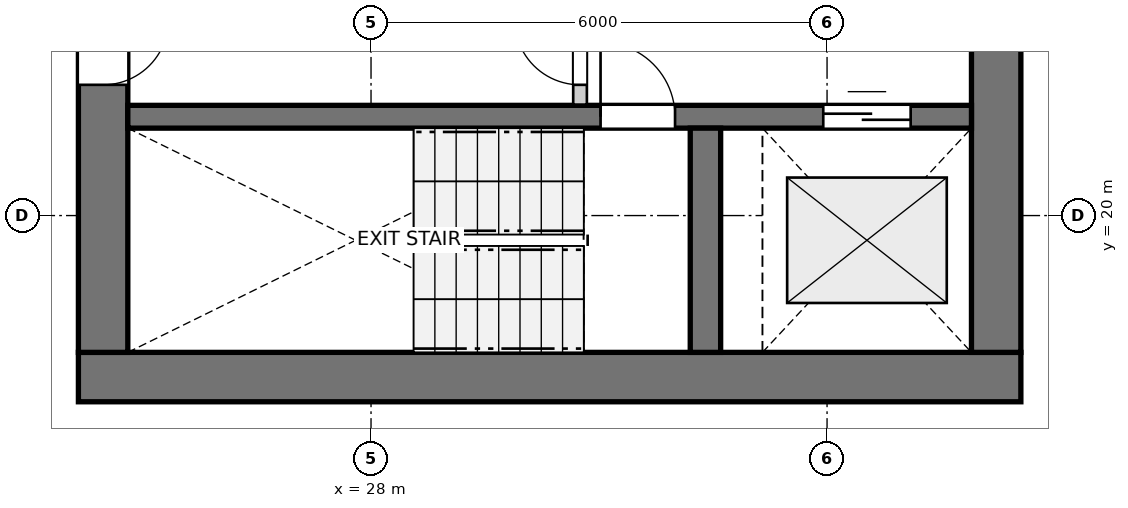
"""IFC4 building model, lengths in metres.
Left out: names, types, materials, properties, quantities, classifications, styles, units other than length and angle.
Written with IfcOpenShell. Run it as: python <this file> out.ifc"""

import sys

from ifc_helpers import new_model, si_unit, direction, frame, frame_2d, origin, place, context, subcontext, project, spatial, rectangle, extrude, source, transform, mapped, element, fill, save


model = new_model("IFC4")
c1 = context("Model", 3, precision=1e-05, world=origin(), true_north=direction((0.0, 1.0)))
c2 = subcontext(c1, "Body", "Model", "MODEL_VIEW")
j1 = project(units=[si_unit("LENGTHUNIT", "METRE"), si_unit("PLANEANGLEUNIT", "RADIAN")], contexts=[c1])
p1 = place(None, origin())
s1 = spatial("IfcSite", under=j1, at=p1, CompositionType="ELEMENT")
p2 = place(p1, origin())
s2 = spatial("IfcBuilding", under=s1, at=p2, CompositionType="ELEMENT")
p3 = place(p2, frame((0.0, 0.0, 76.8)))
s3 = spatial("IfcBuildingStorey", under=s2, at=p3, CompositionType="ELEMENT", Elevation=76.8)
p4 = place(p3, frame((24.15, 17.875, 0.0), z_axis=(0.0, 0.0, 1.0), x_axis=(1.0, 0.0, 0.0)))
e1 = element("IfcWall", 1, at=p4, inside=s3, PredefinedType="SHEAR", context=c2, shape_type="SweptSolid", body=[
    extrude(rectangle(XDim=12.4, YDim=0.65, at=frame_2d((6.2, 0.0))), origin(), (0.0, 0.0, 1.0), 2.935),
])
p5 = place(p3, frame((24.475, 33.8, 0.0), z_axis=(0.0, 0.0, 1.0), x_axis=(0.0, -1.0, 0.0)))
e2 = element("IfcWall", 2, at=p5, inside=s3, PredefinedType="SHEAR", context=c2, shape_type="SweptSolid", body=[
    extrude(rectangle(XDim=15.6, YDim=0.65, at=frame_2d((7.8, 0.0))), origin(), (0.0, 0.0, 1.0), 2.935),
])
p6 = place(p5, frame((7.05, 0.0, 0.0)))
e3 = element("IfcOpeningElement", 3, at=p6, cuts=e2, PredefinedType="OPENING", context=c2, shape_type="SweptSolid", body=[
    extrude(rectangle(XDim=1.5, YDim=2.15, at=frame_2d((0.75, 1.075))), frame((0.0, 0.335, 0.0), z_axis=(0.0, -1.0, 0.0), x_axis=(1.0, 0.0, 0.0)), (0.0, 0.0, 1.0), 0.67),
])
p7 = place(p5, frame((3.52, 0.0, 0.0)))
e4 = element("IfcOpeningElement", 4, at=p7, cuts=e2, PredefinedType="OPENING", context=c2, shape_type="SweptSolid", body=[
    extrude(rectangle(XDim=0.86, YDim=2.05, at=frame_2d((0.43, 1.025))), frame((0.0, 0.335, 0.0), z_axis=(0.0, -1.0, 0.0), x_axis=(1.0, 0.0, 0.0)), (0.0, 0.0, 1.0), 0.67),
])
p8 = place(p5, frame((11.22, 0.0, 0.0)))
e5 = element("IfcOpeningElement", 5, at=p8, cuts=e2, PredefinedType="OPENING", context=c2, shape_type="SweptSolid", body=[
    extrude(rectangle(XDim=0.86, YDim=2.05, at=frame_2d((0.43, 1.025))), frame((0.0, 0.335, 0.0), z_axis=(0.0, -1.0, 0.0), x_axis=(1.0, 0.0, 0.0)), (0.0, 0.0, 1.0), 0.67),
])
p9 = place(p3, frame((36.225, 18.2, 0.0), z_axis=(0.0, 0.0, 1.0), x_axis=(0.0, 1.0, 0.0)))
e6 = element("IfcWall", 6, at=p9, inside=s3, PredefinedType="SHEAR", context=c2, shape_type="SweptSolid", body=[
    extrude(rectangle(XDim=15.6, YDim=0.65, at=frame_2d((7.8, 0.0))), origin(), (0.0, 0.0, 1.0), 2.935),
])
p10 = place(p9, frame((4.25, 0.0, 0.0)))
e7 = element("IfcOpeningElement", 7, at=p10, cuts=e6, PredefinedType="OPENING", context=c2, shape_type="SweptSolid", body=[
    extrude(rectangle(XDim=1.1, YDim=2.15, at=frame_2d((0.55, 1.075))), frame((0.0, 0.335, 0.0), z_axis=(0.0, -1.0, 0.0), x_axis=(1.0, 0.0, 0.0)), (0.0, 0.0, 1.0), 0.67),
])
p11 = place(p9, frame((10.25, 0.0, 0.0)))
e8 = element("IfcOpeningElement", 8, at=p11, cuts=e6, PredefinedType="OPENING", context=c2, shape_type="SweptSolid", body=[
    extrude(rectangle(XDim=1.1, YDim=2.15, at=frame_2d((0.55, 1.075))), frame((0.0, 0.335, 0.0), z_axis=(0.0, -1.0, 0.0), x_axis=(1.0, 0.0, 0.0)), (0.0, 0.0, 1.0), 0.67),
])
p12 = place(p3, frame((24.8, 21.3, 0.0), z_axis=(0.0, 0.0, 1.0), x_axis=(1.0, 0.0, 0.0)))
e9 = element("IfcWall", 9, at=p12, inside=s3, PredefinedType="SHEAR", context=c2, shape_type="SweptSolid", body=[
    extrude(rectangle(XDim=11.1, YDim=0.3, at=frame_2d((5.55, 0.0))), origin(), (0.0, 0.0, 1.0), 2.935),
])
p13 = place(p12, frame((6.22, 0.0, 0.0)))
e10 = element("IfcOpeningElement", 10, at=p13, cuts=e9, PredefinedType="OPENING", context=c2, shape_type="SweptSolid", body=[
    extrude(rectangle(XDim=0.98, YDim=2.15, at=frame_2d((0.49, 1.075))), frame((0.0, 0.16, 0.0), z_axis=(0.0, -1.0, 0.0), x_axis=(1.0, 0.0, 0.0)), (0.0, 0.0, 1.0), 0.32),
])
p14 = place(p12, frame((9.15, 0.0, 0.0)))
e11 = element("IfcOpeningElement", 11, at=p14, cuts=e9, PredefinedType="OPENING", context=c2, shape_type="SweptSolid", body=[
    extrude(rectangle(XDim=1.15, YDim=2.15, at=frame_2d((0.575, 1.075))), frame((0.0, 0.16, 0.0), z_axis=(0.0, -1.0, 0.0), x_axis=(1.0, 0.0, 0.0)), (0.0, 0.0, 1.0), 0.32),
])
p15 = place(p3, frame((32.4, 18.2, 0.0), z_axis=(0.0, 0.0, 1.0), x_axis=(0.0, 1.0, 0.0)))
e12 = element("IfcWall", 12, at=p15, inside=s3, PredefinedType="SHEAR", context=c2, shape_type="SweptSolid", body=[
    extrude(rectangle(XDim=2.95, YDim=0.4, at=frame_2d((1.475, 0.0))), origin(), (0.0, 0.0, 1.0), 2.935),
])
p16 = place(p3, frame((30.75, 21.46, 0.0), z_axis=(0.0, 0.0, 1.0), x_axis=(0.0, 1.0, 0.0)))
e13 = element("IfcWall", 13, at=p16, inside=s3, PredefinedType="PARTITIONING", context=c2, shape_type="SweptSolid", body=[
    extrude(rectangle(XDim=3.11, YDim=0.18, at=frame_2d((1.555, 0.0))), origin(), (0.0, 0.0, 1.0), 2.935),
])
p17 = place(p16, frame((0.26, 0.0, 0.0)))
e14 = element("IfcOpeningElement", 14, at=p17, cuts=e13, PredefinedType="OPENING", context=c2, shape_type="SweptSolid", body=[
    extrude(rectangle(XDim=0.86, YDim=2.05, at=frame_2d((0.43, 1.025))), frame((0.0, 0.1, 0.0), z_axis=(0.0, -1.0, 0.0), x_axis=(1.0, 0.0, 0.0)), (0.0, 0.0, 1.0), 0.2),
])
m1 = source(origin(), c2, "Body", "SweptSolid", [
    extrude(rectangle(XDim=0.98, YDim=2.15, at=frame_2d((0.49, 1.075))), frame((0.0, 0.025, 0.0), z_axis=(0.0, -1.0, 0.0), x_axis=(1.0, 0.0, 0.0)), (0.0, 0.0, 1.0), 0.05),
])
p18 = place(p13, origin())
e15 = element("IfcDoor", 15, at=p18, inside=s3, OperationType="SINGLE_SWING_LEFT", PredefinedType="DOOR", context=c2, shape_type="MappedRepresentation", body=[
    mapped(m1, transform((0.0, 0.0, 0.0), x_axis=(1.0, 0.0, 0.0), y_axis=(0.0, 1.0, 0.0), z_axis=(0.0, 0.0, 1.0), scale=1.0)),
])
fill(e10, e15)
m2 = source(origin(), c2, "Body", "SweptSolid", [
    extrude(rectangle(XDim=1.15, YDim=2.15, at=frame_2d((0.575, 1.075))), frame((0.0, 0.025, 0.0), z_axis=(0.0, -1.0, 0.0), x_axis=(1.0, 0.0, 0.0)), (0.0, 0.0, 1.0), 0.05),
])
p19 = place(p14, origin())
e16 = element("IfcDoor", 16, at=p19, inside=s3, OperationType="DOUBLE_DOOR_SLIDING", PredefinedType="DOOR", context=c2, shape_type="MappedRepresentation", body=[
    mapped(m2, transform((0.0, 0.0, 0.0), x_axis=(1.0, 0.0, 0.0), y_axis=(0.0, 1.0, 0.0), z_axis=(0.0, 0.0, 1.0), scale=1.0)),
])
fill(e11, e16)
m3 = source(origin(), c2, "Body", "SweptSolid", [
    extrude(rectangle(XDim=0.86, YDim=2.05, at=frame_2d((0.43, 1.025))), frame((0.0, 0.025, 0.0), z_axis=(0.0, -1.0, 0.0), x_axis=(1.0, 0.0, 0.0)), (0.0, 0.0, 1.0), 0.05),
])
p20 = place(p8, origin())
e17 = element("IfcDoor", 17, at=p20, inside=s3, OperationType="SINGLE_SWING_LEFT", PredefinedType="DOOR", context=c2, shape_type="MappedRepresentation", body=[
    mapped(m3, transform((0.0, 0.0, 0.0), x_axis=(1.0, 0.0, 0.0), y_axis=(0.0, 1.0, 0.0), z_axis=(0.0, 0.0, 1.0), scale=1.0)),
])
fill(e5, e17)
p21 = place(p17, origin())
e18 = element("IfcDoor", 18, at=p21, inside=s3, OperationType="SINGLE_SWING_RIGHT", PredefinedType="DOOR", context=c2, shape_type="MappedRepresentation", body=[
    mapped(m3, transform((0.0, 0.0, 0.0), x_axis=(1.0, 0.0, 0.0), y_axis=(0.0, 1.0, 0.0), z_axis=(0.0, 0.0, 1.0), scale=1.0)),
])
fill(e14, e18)
save(model, sys.argv[1])
